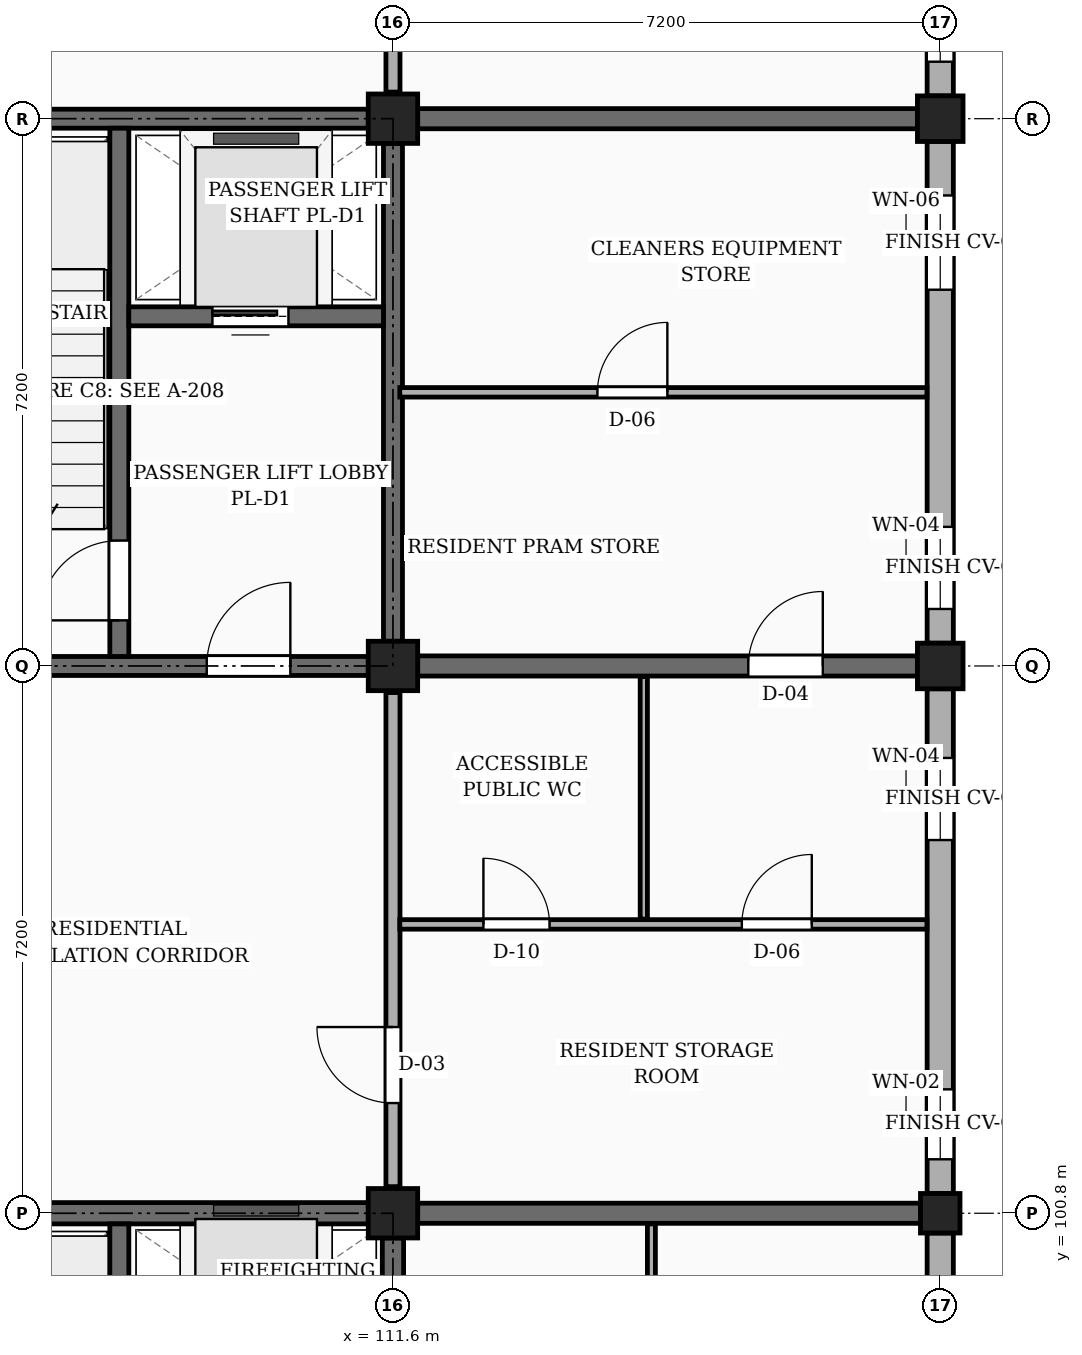
"""IFC4 building model, lengths in metres.
Left out: names, types, materials, properties, quantities, classifications, styles, units other than length and angle.
Written with IfcOpenShell. Run it as: python <this file> out.ifc"""

import sys

from ifc_helpers import new_model, si_unit, direction, frame, frame_2d, origin, origin_2d, place, context, subcontext, project, spatial, rectangle, circle, extrude, element, fill, save


model = new_model("IFC4")
c1 = context("Model", 3, precision=1e-05, world=origin(), true_north=direction((0.0, 1.0)))
c2 = subcontext(c1, "Body", "Model", "MODEL_VIEW")
j1 = project(units=[si_unit("LENGTHUNIT", "METRE"), si_unit("PLANEANGLEUNIT", "RADIAN")], contexts=[c1])
p1 = place(None, origin())
s1 = spatial("IfcSite", under=j1, at=p1, CompositionType="ELEMENT")
p2 = place(p1, origin())
s2 = spatial("IfcBuilding", under=s1, at=p2, CompositionType="ELEMENT")
p3 = place(p2, origin())
s3 = spatial("IfcBuildingStorey", under=s2, at=p3, CompositionType="ELEMENT", Elevation=0.0)
for number, where, z_axis, x_axis in (
    (1, (111.6, 100.8, 0.0), (0.0, 0.0, 1.0), (1.0, 0.0, 0.0)),
    (2, (111.6, 108.0, 0.0), (0.0, 0.0, 1.0), (1.0, 0.0, 0.0)),
    (3, (111.6, 115.2, 0.0), (0.0, 0.0, 1.0), (1.0, 0.0, 0.0)),
):
    element("IfcColumn", number, at=place(p3, frame(where, z_axis=z_axis, x_axis=x_axis)), inside=s3, PredefinedType="COLUMN", context=c2, shape_type="SweptSolid", body=[
        extrude(rectangle(XDim=0.65, YDim=0.65, at=origin_2d()), origin(), (0.0, 0.0, 1.0), 4.5),
    ])
p4 = place(p3, frame((118.8, 100.8, 0.0), z_axis=(0.0, 0.0, 1.0), x_axis=(1.0, 0.0, 0.0)))
e4 = element("IfcColumn", 4, at=p4, inside=s3, PredefinedType="COLUMN", context=c2, shape_type="SweptSolid", body=[
    extrude(circle(Radius=0.26, at=origin_2d()), origin(), (0.0, 0.0, 1.0), 4.5),
])
for number, where, z_axis, x_axis in (
    (5, (118.8, 108.0, 0.0), (0.0, 0.0, 1.0), (1.0, 0.0, 0.0)),
    (6, (118.8, 115.2, 0.0), (0.0, 0.0, 1.0), (1.0, 0.0, 0.0)),
):
    element("IfcColumn", number, at=place(p3, frame(where, z_axis=z_axis, x_axis=x_axis)), inside=s3, PredefinedType="COLUMN", context=c2, shape_type="SweptSolid", body=[
        extrude(rectangle(XDim=0.6, YDim=0.6, at=origin_2d()), origin(), (0.0, 0.0, 1.0), 4.5),
    ])
p5 = place(p3, frame((111.925, 100.8, 0.0), z_axis=(0.0, 0.0, 1.0), x_axis=(1.0, 0.0, 0.0)))
e7 = element("IfcWall", 7, at=p5, inside=s3, PredefinedType="SOLIDWALL", context=c2, shape_type="SweptSolid", body=[
    extrude(rectangle(XDim=6.615, YDim=0.265, at=frame_2d((3.308, 0.0))), origin(), (0.0, 0.0, 1.0), 3.54),
])
p6 = place(p3, frame((111.925, 108.0, 0.0), z_axis=(0.0, 0.0, 1.0), x_axis=(1.0, 0.0, 0.0)))
e8 = element("IfcWall", 8, at=p6, inside=s3, PredefinedType="SOLIDWALL", context=c2, shape_type="SweptSolid", body=[
    extrude(rectangle(XDim=6.575, YDim=0.265, at=frame_2d((3.288, 0.0))), origin(), (0.0, 0.0, 1.0), 3.54),
])
p7 = place(p6, frame((4.35, 0.0, 0.0)))
e9 = element("IfcOpeningElement", 9, at=p7, cuts=e8, PredefinedType="OPENING", context=c2, shape_type="SweptSolid", body=[
    extrude(rectangle(XDim=0.98, YDim=2.12, at=frame_2d((0.49, 1.06))), frame((0.0, 0.143, 0.0), z_axis=(0.0, -1.0, 0.0), x_axis=(1.0, 0.0, 0.0)), (0.0, 0.0, 1.0), 0.285),
])
p8 = place(p3, frame((111.925, 115.2, 0.0), z_axis=(0.0, 0.0, 1.0), x_axis=(1.0, 0.0, 0.0)))
e10 = element("IfcWall", 10, at=p8, inside=s3, PredefinedType="SOLIDWALL", context=c2, shape_type="SweptSolid", body=[
    extrude(rectangle(XDim=6.575, YDim=0.265, at=frame_2d((3.288, 0.0))), origin(), (0.0, 0.0, 1.0), 3.54),
])
p9 = place(p3, frame((118.8, 93.9, 0.0), z_axis=(0.0, 0.0, 1.0), x_axis=(0.0, 1.0, 0.0)))
e11 = element("IfcWall", 11, at=p9, inside=s3, PredefinedType="SOLIDWALL", context=c2, shape_type="SweptSolid", body=[
    extrude(rectangle(XDim=6.64, YDim=0.345, at=frame_2d((3.32, 0.0))), origin(), (0.0, 0.0, 1.0), 3.81),
])
p10 = place(p9, frame((0.45, 0.0, 0.78)))
e12 = element("IfcOpeningElement", 12, at=p10, cuts=e11, PredefinedType="OPENING", context=c2, shape_type="SweptSolid", body=[
    extrude(rectangle(XDim=1.45, YDim=1.44, at=frame_2d((0.725, 0.72))), frame((0.0, 0.183, 0.0), z_axis=(0.0, -1.0, 0.0), x_axis=(1.0, 0.0, 0.0)), (0.0, 0.0, 1.0), 0.365),
])
p11 = place(p9, frame((4.65, 0.0, 0.78)))
e13 = element("IfcOpeningElement", 13, at=p11, cuts=e11, PredefinedType="OPENING", context=c2, shape_type="SweptSolid", body=[
    extrude(rectangle(XDim=0.92, YDim=1.15, at=frame_2d((0.46, 0.575))), frame((0.0, 0.183, 0.0), z_axis=(0.0, -1.0, 0.0), x_axis=(1.0, 0.0, 0.0)), (0.0, 0.0, 1.0), 0.365),
])
p12 = place(p3, frame((118.8, 101.06, 0.0), z_axis=(0.0, 0.0, 1.0), x_axis=(0.0, 1.0, 0.0)))
e14 = element("IfcWall", 14, at=p12, inside=s3, PredefinedType="SOLIDWALL", context=c2, shape_type="SweptSolid", body=[
    extrude(rectangle(XDim=6.64, YDim=0.345, at=frame_2d((3.32, 0.0))), origin(), (0.0, 0.0, 1.0), 3.81),
])
p13 = place(p12, frame((0.45, 0.0, 0.78)))
e15 = element("IfcOpeningElement", 15, at=p13, cuts=e14, PredefinedType="OPENING", context=c2, shape_type="SweptSolid", body=[
    extrude(rectangle(XDim=0.92, YDim=1.15, at=frame_2d((0.46, 0.575))), frame((0.0, 0.183, 0.0), z_axis=(0.0, -1.0, 0.0), x_axis=(1.0, 0.0, 0.0)), (0.0, 0.0, 1.0), 0.365),
])
p14 = place(p12, frame((4.65, 0.0, 0.78)))
e16 = element("IfcOpeningElement", 16, at=p14, cuts=e14, PredefinedType="OPENING", context=c2, shape_type="SweptSolid", body=[
    extrude(rectangle(XDim=1.08, YDim=1.15, at=frame_2d((0.54, 0.575))), frame((0.0, 0.183, 0.0), z_axis=(0.0, -1.0, 0.0), x_axis=(1.0, 0.0, 0.0)), (0.0, 0.0, 1.0), 0.365),
])
p15 = place(p3, frame((118.8, 108.3, 0.0), z_axis=(0.0, 0.0, 1.0), x_axis=(0.0, 1.0, 0.0)))
e17 = element("IfcWall", 17, at=p15, inside=s3, PredefinedType="SOLIDWALL", context=c2, shape_type="SweptSolid", body=[
    extrude(rectangle(XDim=6.6, YDim=0.345, at=frame_2d((3.3, 0.0))), origin(), (0.0, 0.0, 1.0), 3.81),
])
p16 = place(p15, frame((0.45, 0.0, 0.78)))
e18 = element("IfcOpeningElement", 18, at=p16, cuts=e17, PredefinedType="OPENING", context=c2, shape_type="SweptSolid", body=[
    extrude(rectangle(XDim=1.08, YDim=1.15, at=frame_2d((0.54, 0.575))), frame((0.0, 0.183, 0.0), z_axis=(0.0, -1.0, 0.0), x_axis=(1.0, 0.0, 0.0)), (0.0, 0.0, 1.0), 0.365),
])
p17 = place(p15, frame((4.65, 0.0, 0.78)))
e19 = element("IfcOpeningElement", 19, at=p17, cuts=e17, PredefinedType="OPENING", context=c2, shape_type="SweptSolid", body=[
    extrude(rectangle(XDim=1.24, YDim=1.15, at=frame_2d((0.62, 0.575))), frame((0.0, 0.183, 0.0), z_axis=(0.0, -1.0, 0.0), x_axis=(1.0, 0.0, 0.0)), (0.0, 0.0, 1.0), 0.365),
])
p18 = place(p3, frame((118.8, 115.5, 0.0), z_axis=(0.0, 0.0, 1.0), x_axis=(0.0, 1.0, 0.0)))
e20 = element("IfcWall", 20, at=p18, inside=s3, PredefinedType="SOLIDWALL", context=c2, shape_type="SweptSolid", body=[
    extrude(rectangle(XDim=6.6, YDim=0.345, at=frame_2d((3.3, 0.0))), origin(), (0.0, 0.0, 1.0), 3.81),
])
p19 = place(p18, frame((0.45, 0.0, 0.78)))
e21 = element("IfcOpeningElement", 21, at=p19, cuts=e20, PredefinedType="OPENING", context=c2, shape_type="SweptSolid", body=[
    extrude(rectangle(XDim=1.24, YDim=1.15, at=frame_2d((0.62, 0.575))), frame((0.0, 0.183, 0.0), z_axis=(0.0, -1.0, 0.0), x_axis=(1.0, 0.0, 0.0)), (0.0, 0.0, 1.0), 0.365),
])
p20 = place(p18, frame((4.65, 0.0, 0.78)))
e22 = element("IfcOpeningElement", 22, at=p20, cuts=e20, PredefinedType="OPENING", context=c2, shape_type="SweptSolid", body=[
    extrude(rectangle(XDim=1.4, YDim=1.15, at=frame_2d((0.7, 0.575))), frame((0.0, 0.183, 0.0), z_axis=(0.0, -1.0, 0.0), x_axis=(1.0, 0.0, 0.0)), (0.0, 0.0, 1.0), 0.365),
])
p21 = place(p3, frame((104.725, 100.8, 0.0), z_axis=(0.0, 0.0, 1.0), x_axis=(1.0, 0.0, 0.0)))
e23 = element("IfcWall", 23, at=p21, inside=s3, PredefinedType="SHEAR", context=c2, shape_type="SweptSolid", body=[
    extrude(rectangle(XDim=6.55, YDim=0.28, at=frame_2d((3.275, 0.0))), origin(), (0.0, 0.0, 1.0), 4.24),
])
p22 = place(p3, frame((111.6, 93.925, 0.0), z_axis=(0.0, 0.0, 1.0), x_axis=(0.0, 1.0, 0.0)))
e24 = element("IfcWall", 24, at=p22, inside=s3, PredefinedType="SHEAR", context=c2, shape_type="SweptSolid", body=[
    extrude(rectangle(XDim=6.55, YDim=0.28, at=frame_2d((3.275, 0.0))), origin(), (0.0, 0.0, 1.0), 4.24),
])
p23 = place(p3, frame((108.0, 93.74, 0.0), z_axis=(0.0, 0.0, 1.0), x_axis=(0.0, 1.0, 0.0)))
e25 = element("IfcWall", 25, at=p23, inside=s3, PredefinedType="SHEAR", context=c2, shape_type="SweptSolid", body=[
    extrude(rectangle(XDim=6.92, YDim=0.25, at=frame_2d((3.46, 0.0))), origin(), (0.0, 0.0, 1.0), 4.24),
])
p24 = place(p23, frame((0.46, 0.0, 0.0)))
e26 = element("IfcOpeningElement", 26, at=p24, cuts=e25, PredefinedType="OPENING", context=c2, shape_type="SweptSolid", body=[
    extrude(rectangle(XDim=1.05, YDim=2.15, at=frame_2d((0.525, 1.075))), frame((0.0, 0.135, 0.0), z_axis=(0.0, -1.0, 0.0), x_axis=(1.0, 0.0, 0.0)), (0.0, 0.0, 1.0), 0.27),
])
p25 = place(p3, frame((104.725, 115.2, 0.0), z_axis=(0.0, 0.0, 1.0), x_axis=(1.0, 0.0, 0.0)))
e27 = element("IfcWall", 27, at=p25, inside=s3, PredefinedType="SHEAR", context=c2, shape_type="SweptSolid", body=[
    extrude(rectangle(XDim=6.55, YDim=0.25, at=frame_2d((3.275, 0.0))), origin(), (0.0, 0.0, 1.0), 4.24),
])
p26 = place(p3, frame((111.6, 108.325, 0.0), z_axis=(0.0, 0.0, 1.0), x_axis=(0.0, 1.0, 0.0)))
e28 = element("IfcWall", 28, at=p26, inside=s3, PredefinedType="SHEAR", context=c2, shape_type="SweptSolid", body=[
    extrude(rectangle(XDim=6.55, YDim=0.25, at=frame_2d((3.275, 0.0))), origin(), (0.0, 0.0, 1.0), 4.24),
])
p27 = place(p3, frame((104.725, 108.0, 0.0), z_axis=(0.0, 0.0, 1.0), x_axis=(1.0, 0.0, 0.0)))
e29 = element("IfcWall", 29, at=p27, inside=s3, PredefinedType="SHEAR", context=c2, shape_type="SweptSolid", body=[
    extrude(rectangle(XDim=6.55, YDim=0.25, at=frame_2d((3.275, 0.0))), origin(), (0.0, 0.0, 1.0), 4.24),
])
p28 = place(p27, frame((4.425, 0.0, 0.0)))
e30 = element("IfcOpeningElement", 30, at=p28, cuts=e29, PredefinedType="OPENING", context=c2, shape_type="SweptSolid", body=[
    extrude(rectangle(XDim=1.1, YDim=2.15, at=frame_2d((0.55, 1.075))), frame((0.0, 0.135, 0.0), z_axis=(0.0, -1.0, 0.0), x_axis=(1.0, 0.0, 0.0)), (0.0, 0.0, 1.0), 0.27),
])
p29 = place(p3, frame((108.0, 108.125, 0.0), z_axis=(0.0, 0.0, 1.0), x_axis=(0.0, 1.0, 0.0)))
e31 = element("IfcWall", 31, at=p29, inside=s3, PredefinedType="SHEAR", context=c2, shape_type="SweptSolid", body=[
    extrude(rectangle(XDim=6.95, YDim=0.25, at=frame_2d((3.475, 0.0))), origin(), (0.0, 0.0, 1.0), 4.24),
])
p30 = place(p29, frame((0.475, 0.0, 0.0)))
e32 = element("IfcOpeningElement", 32, at=p30, cuts=e31, PredefinedType="OPENING", context=c2, shape_type="SweptSolid", body=[
    extrude(rectangle(XDim=1.05, YDim=2.15, at=frame_2d((0.525, 1.075))), frame((0.0, 0.135, 0.0), z_axis=(0.0, -1.0, 0.0), x_axis=(1.0, 0.0, 0.0)), (0.0, 0.0, 1.0), 0.27),
])
p31 = place(p3, frame((108.125, 112.6, 0.0), z_axis=(0.0, 0.0, 1.0), x_axis=(1.0, 0.0, 0.0)))
e33 = element("IfcWall", 33, at=p31, inside=s3, PredefinedType="SHEAR", context=c2, shape_type="SweptSolid", body=[
    extrude(rectangle(XDim=3.35, YDim=0.25, at=frame_2d((1.675, 0.0))), origin(), (0.0, 0.0, 1.0), 4.24),
])
p32 = place(p31, frame((1.1, 0.0, 0.0)))
e34 = element("IfcOpeningElement", 34, at=p32, cuts=e33, PredefinedType="OPENING", context=c2, shape_type="SweptSolid", body=[
    extrude(rectangle(XDim=1.0, YDim=2.2, at=frame_2d((0.5, 1.1))), frame((0.0, 0.135, 0.0), z_axis=(0.0, -1.0, 0.0), x_axis=(1.0, 0.0, 0.0)), (0.0, 0.0, 1.0), 0.27),
])
p33 = place(p3, frame((111.6, 101.15, 0.0), z_axis=(0.0, 0.0, 1.0), x_axis=(0.0, 1.0, 0.0)))
e35 = element("IfcWall", 35, at=p33, inside=s3, PredefinedType="PARTITIONING", context=c2, shape_type="SweptSolid", body=[
    extrude(rectangle(XDim=6.5, YDim=0.185, at=frame_2d((3.25, 0.0))), origin(), (0.0, 0.0, 1.0), 3.49),
])
p34 = place(p33, frame((1.1, 0.0, 0.0)))
e36 = element("IfcOpeningElement", 36, at=p34, cuts=e35, PredefinedType="OPENING", context=c2, shape_type="SweptSolid", body=[
    extrude(rectangle(XDim=1.0, YDim=2.15, at=frame_2d((0.5, 1.075))), frame((0.0, 0.103, 0.0), z_axis=(0.0, -1.0, 0.0), x_axis=(1.0, 0.0, 0.0)), (0.0, 0.0, 1.0), 0.205),
])
p35 = place(p3, frame((111.6, 115.55, 0.0), z_axis=(0.0, 0.0, 1.0), x_axis=(0.0, 1.0, 0.0)))
e37 = element("IfcWall", 37, at=p35, inside=s3, PredefinedType="PARTITIONING", context=c2, shape_type="SweptSolid", body=[
    extrude(rectangle(XDim=6.5, YDim=0.185, at=frame_2d((3.25, 0.0))), origin(), (0.0, 0.0, 1.0), 3.49),
])
p36 = place(p35, frame((1.1, 0.0, 0.0)))
e38 = element("IfcOpeningElement", 38, at=p36, cuts=e37, PredefinedType="OPENING", context=c2, shape_type="SweptSolid", body=[
    extrude(rectangle(XDim=0.94, YDim=2.12, at=frame_2d((0.47, 1.06))), frame((0.0, 0.103, 0.0), z_axis=(0.0, -1.0, 0.0), x_axis=(1.0, 0.0, 0.0)), (0.0, 0.0, 1.0), 0.205),
])
p37 = place(p3, frame((115.0, 96.97, 0.0), z_axis=(0.0, 0.0, 1.0), x_axis=(0.0, 1.0, 0.0)))
e39 = element("IfcWall", 39, at=p37, inside=s3, PredefinedType="PARTITIONING", context=c2, shape_type="SweptSolid", body=[
    extrude(rectangle(XDim=3.69, YDim=0.105, at=frame_2d((1.845, 0.0))), origin(), (0.0, 0.0, 1.0), 3.675),
])
p38 = place(p3, frame((111.69, 104.6, 0.0), z_axis=(0.0, 0.0, 1.0), x_axis=(1.0, 0.0, 0.0)))
e40 = element("IfcWall", 40, at=p38, inside=s3, PredefinedType="PARTITIONING", context=c2, shape_type="SweptSolid", body=[
    extrude(rectangle(XDim=6.935, YDim=0.125, at=frame_2d((3.468, 0.0))), origin(), (0.0, 0.0, 1.0), 3.675),
])
p39 = place(p38, frame((1.1, 0.0, 0.0)))
e41 = element("IfcOpeningElement", 41, at=p39, cuts=e40, PredefinedType="OPENING", context=c2, shape_type="SweptSolid", body=[
    extrude(rectangle(XDim=0.87, YDim=2.05, at=frame_2d((0.435, 1.025))), frame((0.0, 0.073, 0.0), z_axis=(0.0, -1.0, 0.0), x_axis=(1.0, 0.0, 0.0)), (0.0, 0.0, 1.0), 0.145),
])
p40 = place(p38, frame((4.5, 0.0, 0.0)))
e42 = element("IfcOpeningElement", 42, at=p40, cuts=e40, PredefinedType="OPENING", context=c2, shape_type="SweptSolid", body=[
    extrude(rectangle(XDim=0.92, YDim=2.1, at=frame_2d((0.46, 1.05))), frame((0.0, 0.073, 0.0), z_axis=(0.0, -1.0, 0.0), x_axis=(1.0, 0.0, 0.0)), (0.0, 0.0, 1.0), 0.145),
])
p41 = place(p3, frame((114.9, 104.67, 0.0), z_axis=(0.0, 0.0, 1.0), x_axis=(0.0, 1.0, 0.0)))
e43 = element("IfcWall", 43, at=p41, inside=s3, PredefinedType="PARTITIONING", context=c2, shape_type="SweptSolid", body=[
    extrude(rectangle(XDim=3.19, YDim=0.095, at=frame_2d((1.595, 0.0))), origin(), (0.0, 0.0, 1.0), 3.675),
])
p42 = place(p3, frame((111.69, 111.6, 0.0), z_axis=(0.0, 0.0, 1.0), x_axis=(1.0, 0.0, 0.0)))
e44 = element("IfcWall", 44, at=p42, inside=s3, PredefinedType="PARTITIONING", context=c2, shape_type="SweptSolid", body=[
    extrude(rectangle(XDim=6.935, YDim=0.125, at=frame_2d((3.468, 0.0))), origin(), (0.0, 0.0, 1.0), 3.675),
])
p43 = place(p42, frame((2.6, 0.0, 0.0)))
e45 = element("IfcOpeningElement", 45, at=p43, cuts=e44, PredefinedType="OPENING", context=c2, shape_type="SweptSolid", body=[
    extrude(rectangle(XDim=0.92, YDim=2.1, at=frame_2d((0.46, 1.05))), frame((0.0, 0.073, 0.0), z_axis=(0.0, -1.0, 0.0), x_axis=(1.0, 0.0, 0.0)), (0.0, 0.0, 1.0), 0.145),
])
p44 = place(p13, origin())
e46 = element("IfcWindow", 46, at=p44, inside=s3, PartitioningType="SINGLE_PANEL", PredefinedType="WINDOW", context=c2, shape_type="SweptSolid", body=[
    extrude(rectangle(XDim=0.92, YDim=1.15, at=frame_2d((0.46, 0.575))), frame((0.0, 0.03, 0.0), z_axis=(0.0, -1.0, 0.0), x_axis=(1.0, 0.0, 0.0)), (0.0, 0.0, 1.0), 0.06),
])
fill(e15, e46)
p45 = place(p14, origin())
e47 = element("IfcWindow", 47, at=p45, inside=s3, PartitioningType="SINGLE_PANEL", PredefinedType="WINDOW", context=c2, shape_type="SweptSolid", body=[
    extrude(rectangle(XDim=1.08, YDim=1.15, at=frame_2d((0.54, 0.575))), frame((0.0, 0.03, 0.0), z_axis=(0.0, -1.0, 0.0), x_axis=(1.0, 0.0, 0.0)), (0.0, 0.0, 1.0), 0.06),
])
fill(e16, e47)
p46 = place(p16, origin())
e48 = element("IfcWindow", 48, at=p46, inside=s3, PartitioningType="SINGLE_PANEL", PredefinedType="WINDOW", context=c2, shape_type="SweptSolid", body=[
    extrude(rectangle(XDim=1.08, YDim=1.15, at=frame_2d((0.54, 0.575))), frame((0.0, 0.03, 0.0), z_axis=(0.0, -1.0, 0.0), x_axis=(1.0, 0.0, 0.0)), (0.0, 0.0, 1.0), 0.06),
])
fill(e18, e48)
p47 = place(p17, origin())
e49 = element("IfcWindow", 49, at=p47, inside=s3, PartitioningType="SINGLE_PANEL", PredefinedType="WINDOW", context=c2, shape_type="SweptSolid", body=[
    extrude(rectangle(XDim=1.24, YDim=1.15, at=frame_2d((0.62, 0.575))), frame((0.0, 0.03, 0.0), z_axis=(0.0, -1.0, 0.0), x_axis=(1.0, 0.0, 0.0)), (0.0, 0.0, 1.0), 0.06),
])
fill(e19, e49)
p48 = place(p19, origin())
e50 = element("IfcWindow", 50, at=p48, inside=s3, PartitioningType="SINGLE_PANEL", PredefinedType="WINDOW", context=c2, shape_type="SweptSolid", body=[
    extrude(rectangle(XDim=1.24, YDim=1.15, at=frame_2d((0.62, 0.575))), frame((0.0, 0.03, 0.0), z_axis=(0.0, -1.0, 0.0), x_axis=(1.0, 0.0, 0.0)), (0.0, 0.0, 1.0), 0.06),
])
fill(e21, e50)
p49 = place(p28, frame((1.1, 0.0, 0.0), z_axis=(0.0, 0.0, 1.0), x_axis=(-1.0, 0.0, 0.0)))
e51 = element("IfcDoor", 51, at=p49, inside=s3, OperationType="SINGLE_SWING_RIGHT", PredefinedType="DOOR", context=c2, shape_type="SweptSolid", body=[
    extrude(rectangle(XDim=1.1, YDim=2.15, at=frame_2d((0.55, 1.075))), frame((0.0, 0.025, 0.0), z_axis=(0.0, -1.0, 0.0), x_axis=(1.0, 0.0, 0.0)), (0.0, 0.0, 1.0), 0.05),
])
fill(e30, e51)
p50 = place(p30, frame((1.05, 0.0, 0.0), z_axis=(0.0, 0.0, 1.0), x_axis=(-1.0, 0.0, 0.0)))
e52 = element("IfcDoor", 52, at=p50, inside=s3, OperationType="SINGLE_SWING_LEFT", PredefinedType="DOOR", context=c2, shape_type="SweptSolid", body=[
    extrude(rectangle(XDim=1.05, YDim=2.15, at=frame_2d((0.525, 1.075))), frame((0.0, 0.025, 0.0), z_axis=(0.0, -1.0, 0.0), x_axis=(1.0, 0.0, 0.0)), (0.0, 0.0, 1.0), 0.05),
])
fill(e32, e52)
p51 = place(p32, origin())
e53 = element("IfcDoor", 53, at=p51, inside=s3, OperationType="SLIDING_TO_LEFT", PredefinedType="DOOR", context=c2, shape_type="SweptSolid", body=[
    extrude(rectangle(XDim=1.0, YDim=2.2, at=frame_2d((0.5, 1.1))), frame((0.0, 0.025, 0.0), z_axis=(0.0, -1.0, 0.0), x_axis=(1.0, 0.0, 0.0)), (0.0, 0.0, 1.0), 0.05),
])
fill(e34, e53)
p52 = place(p34, origin())
e54 = element("IfcDoor", 54, at=p52, inside=s3, OperationType="SINGLE_SWING_RIGHT", PredefinedType="DOOR", context=c2, shape_type="SweptSolid", body=[
    extrude(rectangle(XDim=1.0, YDim=2.15, at=frame_2d((0.5, 1.075))), frame((0.0, 0.025, 0.0), z_axis=(0.0, -1.0, 0.0), x_axis=(1.0, 0.0, 0.0)), (0.0, 0.0, 1.0), 0.05),
])
fill(e36, e54)
p53 = place(p39, origin())
e55 = element("IfcDoor", 55, at=p53, inside=s3, OperationType="SINGLE_SWING_LEFT", PredefinedType="DOOR", context=c2, shape_type="SweptSolid", body=[
    extrude(rectangle(XDim=0.87, YDim=2.05, at=frame_2d((0.435, 1.025))), frame((0.0, 0.025, 0.0), z_axis=(0.0, -1.0, 0.0), x_axis=(1.0, 0.0, 0.0)), (0.0, 0.0, 1.0), 0.05),
])
fill(e41, e55)
p54 = place(p40, origin())
e56 = element("IfcDoor", 56, at=p54, inside=s3, OperationType="SINGLE_SWING_RIGHT", PredefinedType="DOOR", context=c2, shape_type="SweptSolid", body=[
    extrude(rectangle(XDim=0.92, YDim=2.1, at=frame_2d((0.46, 1.05))), frame((0.0, 0.025, 0.0), z_axis=(0.0, -1.0, 0.0), x_axis=(1.0, 0.0, 0.0)), (0.0, 0.0, 1.0), 0.05),
])
fill(e42, e56)
p55 = place(p43, origin())
e57 = element("IfcDoor", 57, at=p55, inside=s3, OperationType="SINGLE_SWING_RIGHT", PredefinedType="DOOR", context=c2, shape_type="SweptSolid", body=[
    extrude(rectangle(XDim=0.92, YDim=2.1, at=frame_2d((0.46, 1.05))), frame((0.0, 0.025, 0.0), z_axis=(0.0, -1.0, 0.0), x_axis=(1.0, 0.0, 0.0)), (0.0, 0.0, 1.0), 0.05),
])
fill(e45, e57)
p56 = place(p7, origin())
e58 = element("IfcDoor", 58, at=p56, inside=s3, OperationType="SINGLE_SWING_RIGHT", PredefinedType="DOOR", context=c2, shape_type="SweptSolid", body=[
    extrude(rectangle(XDim=0.98, YDim=2.12, at=frame_2d((0.49, 1.06))), frame((0.0, 0.025, 0.0), z_axis=(0.0, -1.0, 0.0), x_axis=(1.0, 0.0, 0.0)), (0.0, 0.0, 1.0), 0.05),
])
fill(e9, e58)
save(model, sys.argv[1])
